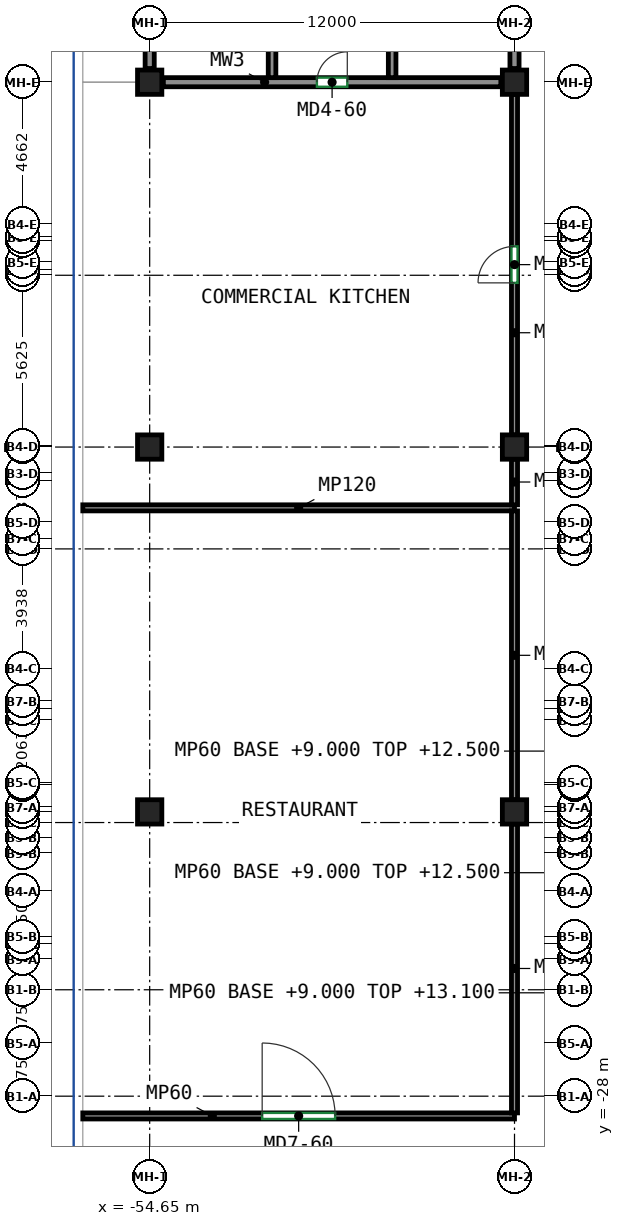
"""IFC4 building model, lengths in metres.
Left out: names, types, materials, properties, quantities, classifications, styles, units other than length and angle.
Written with IfcOpenShell. Run it as: python <this file> out.ifc"""

import sys

from ifc_helpers import new_model, si_unit, direction, frame, frame_2d, origin, origin_2d, place, context, subcontext, project, spatial, rectangle, extrude, source, transform, mapped, element, fill, save


model = new_model("IFC4")
c1 = context("Model", 3, precision=1e-05, world=origin(), true_north=direction((0.0, 1.0)))
c2 = subcontext(c1, "Body", "Model", "MODEL_VIEW")
j1 = project(units=[si_unit("LENGTHUNIT", "METRE"), si_unit("PLANEANGLEUNIT", "RADIAN")], contexts=[c1])
p1 = place(None, origin())
s1 = spatial("IfcSite", under=j1, at=p1, CompositionType="ELEMENT")
p2 = place(p1, origin())
s2 = spatial("IfcBuilding", under=s1, at=p2, CompositionType="ELEMENT")
p3 = place(p2, frame((0.0, 0.0, 9.0)))
s3 = spatial("IfcBuildingStorey", under=s2, at=p3, CompositionType="ELEMENT", Elevation=9.0)
m1 = source(origin(), c2, "Body", "SweptSolid", [
    extrude(rectangle(XDim=0.8, YDim=0.8, at=origin_2d()), origin(), (0.0, 0.0, 1.0), 4.1),
])
for number, where, z_axis, x_axis in (
    (1, (-54.65, -18.65, 0.0), (0.0, 0.0, 1.0), (1.0, 0.0, 0.0)),
    (2, (-54.65, -6.65, 0.0), (0.0, 0.0, 1.0), (1.0, 0.0, 0.0)),
    (3, (-54.65, 5.35, 0.0), (0.0, 0.0, 1.0), (1.0, 0.0, 0.0)),
    (4, (-42.65, -18.65, 0.0), (0.0, 0.0, 1.0), (1.0, 0.0, 0.0)),
    (5, (-42.65, -6.65, 0.0), (0.0, 0.0, 1.0), (1.0, 0.0, 0.0)),
    (6, (-42.65, 5.35, 0.0), (0.0, 0.0, 1.0), (1.0, 0.0, 0.0)),
):
    element("IfcColumn", number, at=place(p3, frame(where, z_axis=z_axis, x_axis=x_axis)), inside=s3, PredefinedType="COLUMN", context=c2, shape_type="MappedRepresentation", body=[
        mapped(m1, transform((0.0, 0.0, 0.0))),
    ])
m2 = source(origin(), c2, "Body", "SweptSolid", [
    extrude(rectangle(XDim=11.1, YDim=0.3, at=frame_2d((5.55, 0.0))), origin(), (0.0, 0.0, 1.0), 3.2),
])
p4 = place(p3, frame((-54.2, 5.35, 0.0), z_axis=(0.0, 0.0, 1.0), x_axis=(1.0, 0.0, 0.0)))
e7 = element("IfcWall", 7, at=p4, inside=s3, PredefinedType="SHEAR", context=c2, shape_type="MappedRepresentation", body=[
    mapped(m2, transform((0.0, 0.0, 0.0))),
])
p5 = place(p4, frame((5.05, 0.0, 0.0)))
e8 = element("IfcOpeningElement", 8, at=p5, cuts=e7, PredefinedType="OPENING", context=c2, shape_type="SweptSolid", body=[
    extrude(rectangle(XDim=1.0, YDim=2.1, at=frame_2d((0.5, 1.05))), frame((0.0, 0.16, 0.0), z_axis=(0.0, -1.0, 0.0), x_axis=(1.0, 0.0, 0.0)), (0.0, 0.0, 1.0), 0.32),
])
for number, where, z_axis, x_axis in (
    (9, (-54.65, 5.8, 0.0), (0.0, 0.0, 1.0), (0.0, 1.0, 0.0)),
    (10, (-42.65, 5.8, 0.0), (0.0, 0.0, 1.0), (0.0, 1.0, 0.0)),
):
    element("IfcWall", number, at=place(p3, frame(where, z_axis=z_axis, x_axis=x_axis)), inside=s3, PredefinedType="SHEAR", context=c2, shape_type="MappedRepresentation", body=[
        mapped(m2, transform((0.0, 0.0, 0.0))),
    ])
m3 = source(origin(), c2, "Body", "SweptSolid", [
    extrude(rectangle(XDim=9.85, YDim=0.25, at=frame_2d((4.925, 0.0))), origin(), (0.0, 0.0, 1.0), 4.1),
])
for number, where, z_axis, x_axis in (
    (11, (-50.625, 5.5, 0.0), (0.0, 0.0, 1.0), (0.0, 1.0, 0.0)),
    (12, (-46.675, 5.5, 0.0), (0.0, 0.0, 1.0), (0.0, 1.0, 0.0)),
):
    element("IfcWall", number, at=place(p3, frame(where, z_axis=z_axis, x_axis=x_axis)), inside=s3, PredefinedType="SHEAR", context=c2, shape_type="MappedRepresentation", body=[
        mapped(m3, transform((0.0, 0.0, 0.0))),
    ])
m4 = source(origin(), c2, "Body", "SweptSolid", [
    extrude(rectangle(XDim=100.7, YDim=0.3, at=frame_2d((50.35, 0.0))), origin(), (0.0, 0.0, 1.0), 4.1),
])
p6 = place(p3, frame((-57.0, -43.55, 0.0), z_axis=(0.0, 0.0, 1.0), x_axis=(0.0, 1.0, 0.0)))
e13 = element("IfcWall", 13, at=p6, inside=s3, PredefinedType="SOLIDWALL", context=c2, shape_type="MappedRepresentation", body=[
    mapped(m4, transform((0.0, 0.0, 0.0))),
])
p7 = place(p6, frame((3.15, 0.0, 0.9)))
e14 = element("IfcOpeningElement", 14, at=p7, cuts=e13, PredefinedType="OPENING", context=c2, shape_type="SweptSolid", body=[
    extrude(rectangle(XDim=2.4, YDim=1.8, at=frame_2d((1.2, 0.9))), frame((0.0, 0.16, 0.0), z_axis=(0.0, -1.0, 0.0), x_axis=(1.0, 0.0, 0.0)), (0.0, 0.0, 1.0), 0.32),
])
p8 = place(p6, frame((7.15, 0.0, 0.9)))
e15 = element("IfcOpeningElement", 15, at=p8, cuts=e13, PredefinedType="OPENING", context=c2, shape_type="SweptSolid", body=[
    extrude(rectangle(XDim=2.4, YDim=1.8, at=frame_2d((1.2, 0.9))), frame((0.0, 0.16, 0.0), z_axis=(0.0, -1.0, 0.0), x_axis=(1.0, 0.0, 0.0)), (0.0, 0.0, 1.0), 0.32),
])
p9 = place(p6, frame((11.15, 0.0, 0.9)))
e16 = element("IfcOpeningElement", 16, at=p9, cuts=e13, PredefinedType="OPENING", context=c2, shape_type="SweptSolid", body=[
    extrude(rectangle(XDim=2.4, YDim=1.8, at=frame_2d((1.2, 0.9))), frame((0.0, 0.16, 0.0), z_axis=(0.0, -1.0, 0.0), x_axis=(1.0, 0.0, 0.0)), (0.0, 0.0, 1.0), 0.32),
])
p10 = place(p6, frame((19.15, 0.0, 0.9)))
e17 = element("IfcOpeningElement", 17, at=p10, cuts=e13, PredefinedType="OPENING", context=c2, shape_type="SweptSolid", body=[
    extrude(rectangle(XDim=2.4, YDim=1.8, at=frame_2d((1.2, 0.9))), frame((0.0, 0.16, 0.0), z_axis=(0.0, -1.0, 0.0), x_axis=(1.0, 0.0, 0.0)), (0.0, 0.0, 1.0), 0.32),
])
p11 = place(p6, frame((23.15, 0.0, 0.9)))
e18 = element("IfcOpeningElement", 18, at=p11, cuts=e13, PredefinedType="OPENING", context=c2, shape_type="SweptSolid", body=[
    extrude(rectangle(XDim=2.4, YDim=1.8, at=frame_2d((1.2, 0.9))), frame((0.0, 0.16, 0.0), z_axis=(0.0, -1.0, 0.0), x_axis=(1.0, 0.0, 0.0)), (0.0, 0.0, 1.0), 0.32),
])
p12 = place(p6, frame((27.15, 0.0, 0.9)))
e19 = element("IfcOpeningElement", 19, at=p12, cuts=e13, PredefinedType="OPENING", context=c2, shape_type="SweptSolid", body=[
    extrude(rectangle(XDim=2.4, YDim=1.8, at=frame_2d((1.2, 0.9))), frame((0.0, 0.16, 0.0), z_axis=(0.0, -1.0, 0.0), x_axis=(1.0, 0.0, 0.0)), (0.0, 0.0, 1.0), 0.32),
])
p13 = place(p6, frame((31.15, 0.0, 0.9)))
e20 = element("IfcOpeningElement", 20, at=p13, cuts=e13, PredefinedType="OPENING", context=c2, shape_type="SweptSolid", body=[
    extrude(rectangle(XDim=2.4, YDim=1.8, at=frame_2d((1.2, 0.9))), frame((0.0, 0.16, 0.0), z_axis=(0.0, -1.0, 0.0), x_axis=(1.0, 0.0, 0.0)), (0.0, 0.0, 1.0), 0.32),
])
p14 = place(p6, frame((39.15, 0.0, 0.9)))
e21 = element("IfcOpeningElement", 21, at=p14, cuts=e13, PredefinedType="OPENING", context=c2, shape_type="SweptSolid", body=[
    extrude(rectangle(XDim=2.4, YDim=1.8, at=frame_2d((1.2, 0.9))), frame((0.0, 0.16, 0.0), z_axis=(0.0, -1.0, 0.0), x_axis=(1.0, 0.0, 0.0)), (0.0, 0.0, 1.0), 0.32),
])
p15 = place(p6, frame((43.15, 0.0, 0.9)))
e22 = element("IfcOpeningElement", 22, at=p15, cuts=e13, PredefinedType="OPENING", context=c2, shape_type="SweptSolid", body=[
    extrude(rectangle(XDim=2.4, YDim=1.8, at=frame_2d((1.2, 0.9))), frame((0.0, 0.16, 0.0), z_axis=(0.0, -1.0, 0.0), x_axis=(1.0, 0.0, 0.0)), (0.0, 0.0, 1.0), 0.32),
])
p16 = place(p6, frame((51.15, 0.0, 0.9)))
e23 = element("IfcOpeningElement", 23, at=p16, cuts=e13, PredefinedType="OPENING", context=c2, shape_type="SweptSolid", body=[
    extrude(rectangle(XDim=2.4, YDim=1.8, at=frame_2d((1.2, 0.9))), frame((0.0, 0.16, 0.0), z_axis=(0.0, -1.0, 0.0), x_axis=(1.0, 0.0, 0.0)), (0.0, 0.0, 1.0), 0.32),
])
p17 = place(p6, frame((55.15, 0.0, 0.9)))
e24 = element("IfcOpeningElement", 24, at=p17, cuts=e13, PredefinedType="OPENING", context=c2, shape_type="SweptSolid", body=[
    extrude(rectangle(XDim=2.4, YDim=1.8, at=frame_2d((1.2, 0.9))), frame((0.0, 0.16, 0.0), z_axis=(0.0, -1.0, 0.0), x_axis=(1.0, 0.0, 0.0)), (0.0, 0.0, 1.0), 0.32),
])
p18 = place(p6, frame((59.15, 0.0, 0.9)))
e25 = element("IfcOpeningElement", 25, at=p18, cuts=e13, PredefinedType="OPENING", context=c2, shape_type="SweptSolid", body=[
    extrude(rectangle(XDim=2.4, YDim=1.8, at=frame_2d((1.2, 0.9))), frame((0.0, 0.16, 0.0), z_axis=(0.0, -1.0, 0.0), x_axis=(1.0, 0.0, 0.0)), (0.0, 0.0, 1.0), 0.32),
])
p19 = place(p6, frame((63.15, 0.0, 0.9)))
e26 = element("IfcOpeningElement", 26, at=p19, cuts=e13, PredefinedType="OPENING", context=c2, shape_type="SweptSolid", body=[
    extrude(rectangle(XDim=2.4, YDim=1.8, at=frame_2d((1.2, 0.9))), frame((0.0, 0.16, 0.0), z_axis=(0.0, -1.0, 0.0), x_axis=(1.0, 0.0, 0.0)), (0.0, 0.0, 1.0), 0.32),
])
p20 = place(p6, frame((67.15, 0.0, 0.9)))
e27 = element("IfcOpeningElement", 27, at=p20, cuts=e13, PredefinedType="OPENING", context=c2, shape_type="SweptSolid", body=[
    extrude(rectangle(XDim=2.4, YDim=1.8, at=frame_2d((1.2, 0.9))), frame((0.0, 0.16, 0.0), z_axis=(0.0, -1.0, 0.0), x_axis=(1.0, 0.0, 0.0)), (0.0, 0.0, 1.0), 0.32),
])
p21 = place(p6, frame((75.15, 0.0, 0.9)))
e28 = element("IfcOpeningElement", 28, at=p21, cuts=e13, PredefinedType="OPENING", context=c2, shape_type="SweptSolid", body=[
    extrude(rectangle(XDim=2.4, YDim=1.8, at=frame_2d((1.2, 0.9))), frame((0.0, 0.16, 0.0), z_axis=(0.0, -1.0, 0.0), x_axis=(1.0, 0.0, 0.0)), (0.0, 0.0, 1.0), 0.32),
])
p22 = place(p6, frame((79.15, 0.0, 0.9)))
e29 = element("IfcOpeningElement", 29, at=p22, cuts=e13, PredefinedType="OPENING", context=c2, shape_type="SweptSolid", body=[
    extrude(rectangle(XDim=2.4, YDim=1.8, at=frame_2d((1.2, 0.9))), frame((0.0, 0.16, 0.0), z_axis=(0.0, -1.0, 0.0), x_axis=(1.0, 0.0, 0.0)), (0.0, 0.0, 1.0), 0.32),
])
p23 = place(p6, frame((83.15, 0.0, 0.9)))
e30 = element("IfcOpeningElement", 30, at=p23, cuts=e13, PredefinedType="OPENING", context=c2, shape_type="SweptSolid", body=[
    extrude(rectangle(XDim=2.4, YDim=1.8, at=frame_2d((1.2, 0.9))), frame((0.0, 0.16, 0.0), z_axis=(0.0, -1.0, 0.0), x_axis=(1.0, 0.0, 0.0)), (0.0, 0.0, 1.0), 0.32),
])
p24 = place(p6, frame((87.15, 0.0, 0.9)))
e31 = element("IfcOpeningElement", 31, at=p24, cuts=e13, PredefinedType="OPENING", context=c2, shape_type="SweptSolid", body=[
    extrude(rectangle(XDim=2.4, YDim=1.8, at=frame_2d((1.2, 0.9))), frame((0.0, 0.16, 0.0), z_axis=(0.0, -1.0, 0.0), x_axis=(1.0, 0.0, 0.0)), (0.0, 0.0, 1.0), 0.32),
])
p25 = place(p6, frame((91.15, 0.0, 0.9)))
e32 = element("IfcOpeningElement", 32, at=p25, cuts=e13, PredefinedType="OPENING", context=c2, shape_type="SweptSolid", body=[
    extrude(rectangle(XDim=2.4, YDim=1.8, at=frame_2d((1.2, 0.9))), frame((0.0, 0.16, 0.0), z_axis=(0.0, -1.0, 0.0), x_axis=(1.0, 0.0, 0.0)), (0.0, 0.0, 1.0), 0.32),
])
p26 = place(p6, frame((95.15, 0.0, 0.9)))
e33 = element("IfcOpeningElement", 33, at=p26, cuts=e13, PredefinedType="OPENING", context=c2, shape_type="SweptSolid", body=[
    extrude(rectangle(XDim=2.4, YDim=1.8, at=frame_2d((1.2, 0.9))), frame((0.0, 0.16, 0.0), z_axis=(0.0, -1.0, 0.0), x_axis=(1.0, 0.0, 0.0)), (0.0, 0.0, 1.0), 0.32),
])
m5 = source(origin(), c2, "Body", "SweptSolid", [
    extrude(rectangle(XDim=14.2, YDim=0.2, at=frame_2d((7.1, 0.0))), origin(), (0.0, 0.0, 1.0), 3.2),
])
p27 = place(p3, frame((-56.85, -28.65, 0.0), z_axis=(0.0, 0.0, 1.0), x_axis=(1.0, 0.0, 0.0)))
e34 = element("IfcWall", 34, at=p27, inside=s3, PredefinedType="PARTITIONING", context=c2, shape_type="MappedRepresentation", body=[
    mapped(m5, transform((0.0, 0.0, 0.0))),
])
p28 = place(p27, frame((5.9, 0.0, 0.0)))
e35 = element("IfcOpeningElement", 35, at=p28, cuts=e34, PredefinedType="OPENING", context=c2, shape_type="SweptSolid", body=[
    extrude(rectangle(XDim=2.4, YDim=2.4, at=frame_2d((1.2, 1.2))), frame((0.0, 0.11, 0.0), z_axis=(0.0, -1.0, 0.0), x_axis=(1.0, 0.0, 0.0)), (0.0, 0.0, 1.0), 0.22),
])
p29 = place(p3, frame((-56.85, -8.65, 0.0), z_axis=(0.0, 0.0, 1.0), x_axis=(1.0, 0.0, 0.0)))
e36 = element("IfcWall", 36, at=p29, inside=s3, PredefinedType="PARTITIONING", context=c2, shape_type="MappedRepresentation", body=[
    mapped(m5, transform((0.0, 0.0, 0.0))),
])
m6 = source(origin(), c2, "Body", "SweptSolid", [
    extrude(rectangle(XDim=1.8, YDim=0.2, at=frame_2d((0.9, 0.0))), origin(), (0.0, 0.0, 1.0), 4.1),
])
p30 = place(p3, frame((-56.85, 5.35, 0.0), z_axis=(0.0, 0.0, 1.0), x_axis=(1.0, 0.0, 0.0)))
e37 = element("IfcWall", 37, at=p30, inside=s3, PredefinedType="PARTITIONING", context=c2, shape_type="MappedRepresentation", body=[
    mapped(m6, transform((0.0, 0.0, 0.0))),
])
m7 = source(origin(), c2, "Body", "SweptSolid", [
    extrude(rectangle(XDim=9.5, YDim=0.2, at=frame_2d((4.75, 0.0))), origin(), (0.0, 0.0, 1.0), 3.2),
])
for number, where, z_axis, x_axis in (
    (38, (-42.65, -28.55, 0.0), (0.0, 0.0, 1.0), (0.0, 1.0, 0.0)),
    (39, (-42.65, -18.25, 0.0), (0.0, 0.0, 1.0), (0.0, 1.0, 0.0)),
):
    element("IfcWall", number, at=place(p3, frame(where, z_axis=z_axis, x_axis=x_axis)), inside=s3, PredefinedType="PARTITIONING", context=c2, shape_type="MappedRepresentation", body=[
        mapped(m7, transform((0.0, 0.0, 0.0))),
    ])
m8 = source(origin(), c2, "Body", "SweptSolid", [
    extrude(rectangle(XDim=1.5, YDim=0.2, at=frame_2d((0.75, 0.0))), origin(), (0.0, 0.0, 1.0), 3.2),
])
p31 = place(p3, frame((-42.65, -8.55, 0.0), z_axis=(0.0, 0.0, 1.0), x_axis=(0.0, 1.0, 0.0)))
e40 = element("IfcWall", 40, at=p31, inside=s3, PredefinedType="PARTITIONING", context=c2, shape_type="MappedRepresentation", body=[
    mapped(m8, transform((0.0, 0.0, 0.0))),
])
m9 = source(origin(), c2, "Body", "SweptSolid", [
    extrude(rectangle(XDim=11.2, YDim=0.2, at=frame_2d((5.6, 0.0))), origin(), (0.0, 0.0, 1.0), 3.2),
])
p32 = place(p3, frame((-42.65, -6.25, 0.0), z_axis=(0.0, 0.0, 1.0), x_axis=(0.0, 1.0, 0.0)))
e41 = element("IfcWall", 41, at=p32, inside=s3, PredefinedType="PARTITIONING", context=c2, shape_type="MappedRepresentation", body=[
    mapped(m9, transform((0.0, 0.0, 0.0))),
])
p33 = place(p32, frame((5.0, 0.0, 0.0)))
e42 = element("IfcOpeningElement", 42, at=p33, cuts=e41, PredefinedType="OPENING", context=c2, shape_type="SweptSolid", body=[
    extrude(rectangle(XDim=1.2, YDim=2.1, at=frame_2d((0.6, 1.05))), frame((0.0, 0.11, 0.0), z_axis=(0.0, -1.0, 0.0), x_axis=(1.0, 0.0, 0.0)), (0.0, 0.0, 1.0), 0.22),
])
p34 = place(p10, origin())
e43 = element("IfcWindow", 43, at=p34, inside=s3, PartitioningType="SINGLE_PANEL", PredefinedType="WINDOW", context=c2, shape_type="SweptSolid", body=[
    extrude(rectangle(XDim=2.4, YDim=1.8, at=frame_2d((1.2, 0.9))), frame((0.0, 0.03, 0.0), z_axis=(0.0, -1.0, 0.0), x_axis=(1.0, 0.0, 0.0)), (0.0, 0.0, 1.0), 0.06),
])
fill(e17, e43)
p35 = place(p11, origin())
e44 = element("IfcWindow", 44, at=p35, inside=s3, PartitioningType="SINGLE_PANEL", PredefinedType="WINDOW", context=c2, shape_type="SweptSolid", body=[
    extrude(rectangle(XDim=2.4, YDim=1.8, at=frame_2d((1.2, 0.9))), frame((0.0, 0.03, 0.0), z_axis=(0.0, -1.0, 0.0), x_axis=(1.0, 0.0, 0.0)), (0.0, 0.0, 1.0), 0.06),
])
fill(e18, e44)
p36 = place(p12, origin())
e45 = element("IfcWindow", 45, at=p36, inside=s3, PartitioningType="SINGLE_PANEL", PredefinedType="WINDOW", context=c2, shape_type="SweptSolid", body=[
    extrude(rectangle(XDim=2.4, YDim=1.8, at=frame_2d((1.2, 0.9))), frame((0.0, 0.03, 0.0), z_axis=(0.0, -1.0, 0.0), x_axis=(1.0, 0.0, 0.0)), (0.0, 0.0, 1.0), 0.06),
])
fill(e19, e45)
p37 = place(p13, origin())
e46 = element("IfcWindow", 46, at=p37, inside=s3, PartitioningType="SINGLE_PANEL", PredefinedType="WINDOW", context=c2, shape_type="SweptSolid", body=[
    extrude(rectangle(XDim=2.4, YDim=1.8, at=frame_2d((1.2, 0.9))), frame((0.0, 0.03, 0.0), z_axis=(0.0, -1.0, 0.0), x_axis=(1.0, 0.0, 0.0)), (0.0, 0.0, 1.0), 0.06),
])
fill(e20, e46)
p38 = place(p14, origin())
e47 = element("IfcWindow", 47, at=p38, inside=s3, PartitioningType="SINGLE_PANEL", PredefinedType="WINDOW", context=c2, shape_type="SweptSolid", body=[
    extrude(rectangle(XDim=2.4, YDim=1.8, at=frame_2d((1.2, 0.9))), frame((0.0, 0.03, 0.0), z_axis=(0.0, -1.0, 0.0), x_axis=(1.0, 0.0, 0.0)), (0.0, 0.0, 1.0), 0.06),
])
fill(e21, e47)
p39 = place(p15, origin())
e48 = element("IfcWindow", 48, at=p39, inside=s3, PartitioningType="SINGLE_PANEL", PredefinedType="WINDOW", context=c2, shape_type="SweptSolid", body=[
    extrude(rectangle(XDim=2.4, YDim=1.8, at=frame_2d((1.2, 0.9))), frame((0.0, 0.03, 0.0), z_axis=(0.0, -1.0, 0.0), x_axis=(1.0, 0.0, 0.0)), (0.0, 0.0, 1.0), 0.06),
])
fill(e22, e48)
p40 = place(p5, origin())
e49 = element("IfcDoor", 49, at=p40, inside=s3, OperationType="SINGLE_SWING_RIGHT", PredefinedType="DOOR", context=c2, shape_type="SweptSolid", body=[
    extrude(rectangle(XDim=1.0, YDim=2.1, at=frame_2d((0.5, 1.05))), frame((0.0, 0.025, 0.0), z_axis=(0.0, -1.0, 0.0), x_axis=(1.0, 0.0, 0.0)), (0.0, 0.0, 1.0), 0.05),
])
fill(e8, e49)
p41 = place(p28, origin())
e50 = element("IfcDoor", 50, at=p41, inside=s3, OperationType="DOUBLE_DOOR_SINGLE_SWING", PredefinedType="DOOR", context=c2, shape_type="SweptSolid", body=[
    extrude(rectangle(XDim=2.4, YDim=2.4, at=frame_2d((1.2, 1.2))), frame((0.0, 0.025, 0.0), z_axis=(0.0, -1.0, 0.0), x_axis=(1.0, 0.0, 0.0)), (0.0, 0.0, 1.0), 0.05),
])
fill(e35, e50)
p42 = place(p33, origin())
e51 = element("IfcDoor", 51, at=p42, inside=s3, OperationType="SINGLE_SWING_LEFT", PredefinedType="DOOR", context=c2, shape_type="SweptSolid", body=[
    extrude(rectangle(XDim=1.2, YDim=2.1, at=frame_2d((0.6, 1.05))), frame((0.0, 0.025, 0.0), z_axis=(0.0, -1.0, 0.0), x_axis=(1.0, 0.0, 0.0)), (0.0, 0.0, 1.0), 0.05),
])
fill(e42, e51)
save(model, sys.argv[1])
